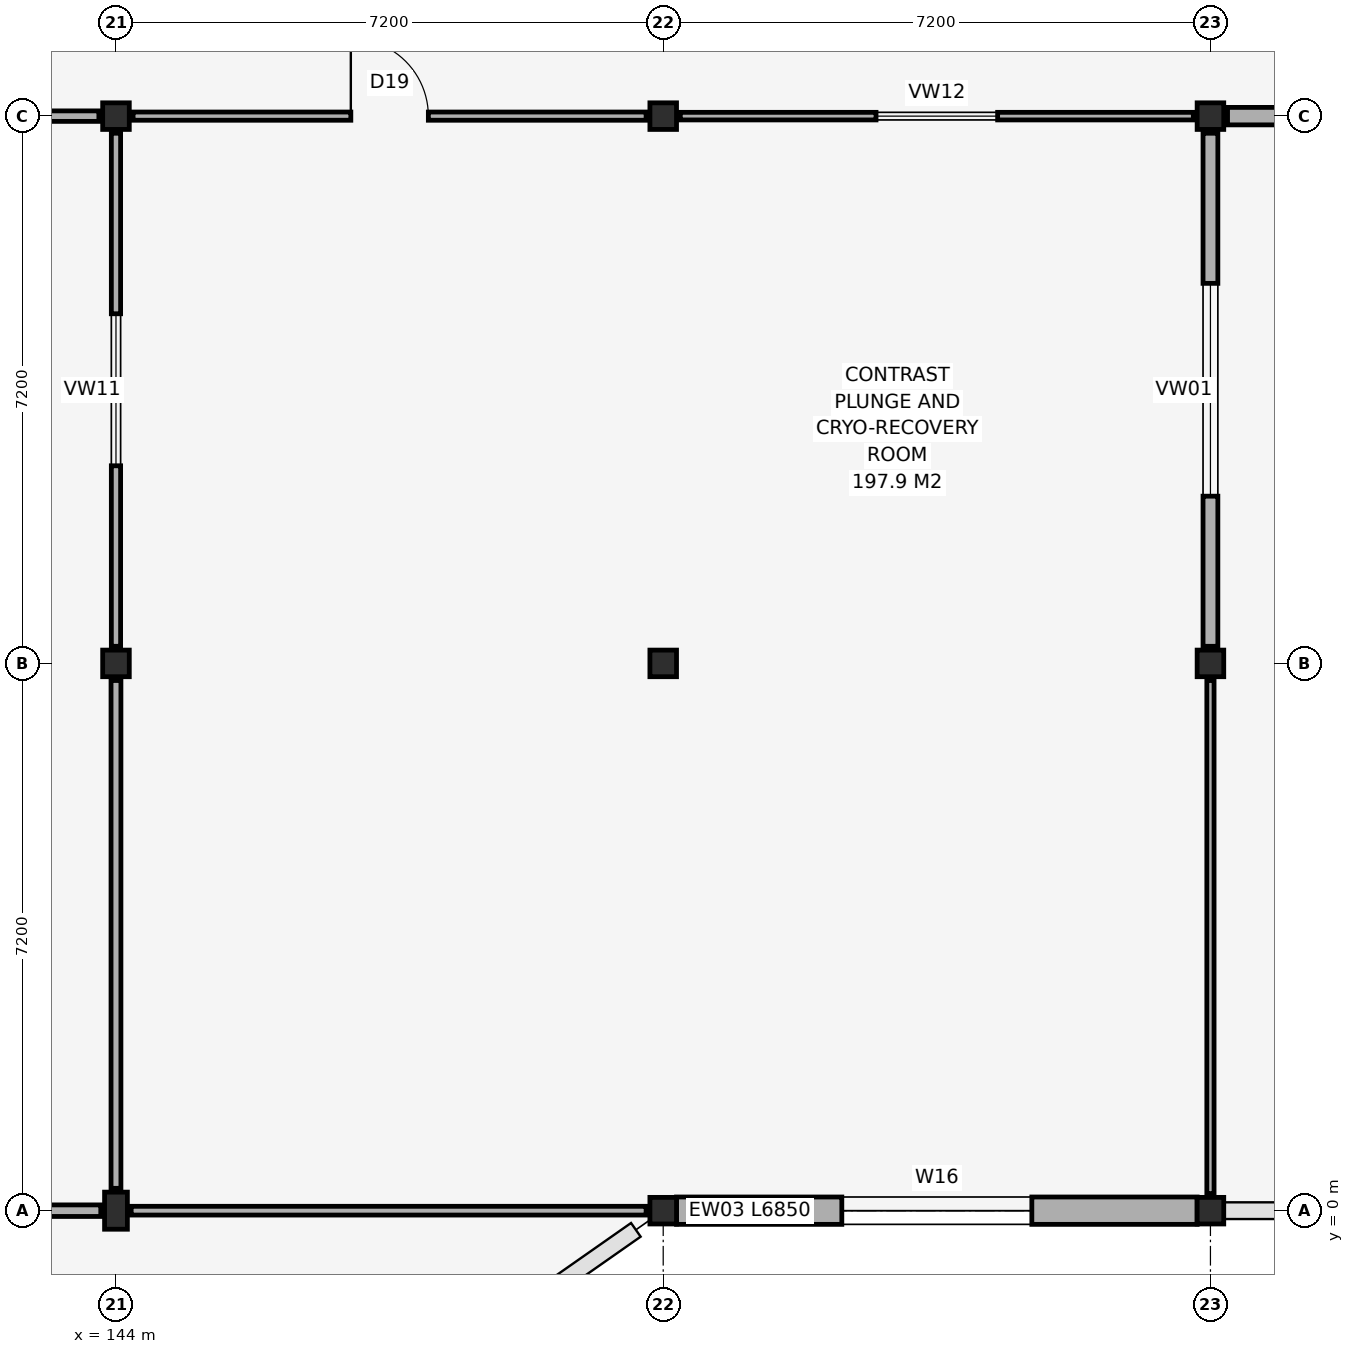
"""IFC4 building model, lengths in metres.
Left out: names, types, materials, properties, quantities, classifications, styles, units other than length and angle.
Written with IfcOpenShell. Run it as: python <this file> out.ifc"""

import sys

from ifc_helpers import new_model, si_unit, direction, frame, frame_2d, origin, origin_2d, place, context, subcontext, project, spatial, rectangle, i_section, extrude, element, fill, save


model = new_model("IFC4")
c1 = context("Model", 3, precision=1e-05, world=origin(), true_north=direction((0.0, 1.0)))
c2 = subcontext(c1, "Body", "Model", "MODEL_VIEW")
j1 = project(units=[si_unit("LENGTHUNIT", "METRE"), si_unit("PLANEANGLEUNIT", "RADIAN")], contexts=[c1])
p1 = place(None, origin())
s1 = spatial("IfcSite", under=j1, at=p1, CompositionType="ELEMENT")
p2 = place(p1, origin())
s2 = spatial("IfcBuilding", under=s1, at=p2, CompositionType="ELEMENT")
p3 = place(p2, frame((0.0, 0.0, 19.2)))
s3 = spatial("IfcBuildingStorey", under=s2, at=p3, CompositionType="ELEMENT", Elevation=19.2)
p4 = place(p3, frame((144.0, 0.0, 0.0), z_axis=(0.0, 0.0, 1.0), x_axis=(1.0, 0.0, 0.0)))
e1 = element("IfcColumn", 1, at=p4, inside=s3, PredefinedType="COLUMN", context=c2, shape_type="SweptSolid", body=[
    extrude(i_section(OverallWidth=0.3, OverallDepth=0.488, WebThickness=0.011, FlangeThickness=0.018, FilletRadius=0.026, at=origin_2d()), origin(), (0.0, 0.0, 1.0), 4.2),
])
for number, where, z_axis, x_axis in (
    (2, (144.0, 7.2, 0.0), (0.0, 0.0, 1.0), (1.0, 0.0, 0.0)),
    (3, (144.0, 14.4, 0.0), (0.0, 0.0, 1.0), (1.0, 0.0, 0.0)),
    (4, (151.2, 0.0, 0.0), (0.0, 0.0, 1.0), (1.0, 0.0, 0.0)),
    (5, (151.2, 7.2, 0.0), (0.0, 0.0, 1.0), (1.0, 0.0, 0.0)),
    (6, (151.2, 14.4, 0.0), (0.0, 0.0, 1.0), (1.0, 0.0, 0.0)),
    (7, (158.4, 0.0, 0.0), (0.0, 0.0, 1.0), (1.0, 0.0, 0.0)),
    (8, (158.4, 7.2, 0.0), (0.0, 0.0, 1.0), (1.0, 0.0, 0.0)),
    (9, (158.4, 14.4, 0.0), (0.0, 0.0, 1.0), (1.0, 0.0, 0.0)),
):
    element("IfcColumn", number, at=place(p3, frame(where, z_axis=z_axis, x_axis=x_axis)), inside=s3, PredefinedType="COLUMN", context=c2, shape_type="SweptSolid", body=[
        extrude(i_section(OverallWidth=0.35, OverallDepth=0.35, WebThickness=0.012, FlangeThickness=0.019, FilletRadius=0.02, at=origin_2d()), origin(), (0.0, 0.0, 1.0), 4.2),
    ])
p5 = place(p3, frame((151.375, 0.0, 0.0), z_axis=(0.0, 0.0, 1.0), x_axis=(1.0, 0.0, 0.0)))
e10 = element("IfcWall", 10, at=p5, inside=s3, PredefinedType="SOLIDWALL", context=c2, shape_type="SweptSolid", body=[
    extrude(rectangle(XDim=6.85, YDim=0.36, at=frame_2d((3.425, 0.0))), origin(), (0.0, 0.0, 1.0), 3.18),
])
p6 = place(p5, frame((2.175, 0.0, 0.95)))
e11 = element("IfcOpeningElement", 11, at=p6, cuts=e10, PredefinedType="OPENING", context=c2, shape_type="SweptSolid", body=[
    extrude(rectangle(XDim=2.5, YDim=1.35, at=frame_2d((1.25, 0.675))), frame((0.0, 0.195, 0.0), z_axis=(0.0, -1.0, 0.0), x_axis=(1.0, 0.0, 0.0)), (0.0, 0.0, 1.0), 0.39),
])
p7 = place(p3, frame((137.025, 0.0, 0.0), z_axis=(0.0, 0.0, 1.0), x_axis=(1.0, 0.0, 0.0)))
e12 = element("IfcWall", 12, at=p7, inside=s3, PredefinedType="PARTITIONING", context=c2, shape_type="SweptSolid", body=[
    extrude(rectangle(XDim=6.775, YDim=0.152, at=frame_2d((3.388, 0.0))), origin(), (0.0, 0.0, 1.0), 3.18),
])
p8 = place(p3, frame((137.025, 14.4, 0.0), z_axis=(0.0, 0.0, 1.0), x_axis=(1.0, 0.0, 0.0)))
e13 = element("IfcWall", 13, at=p8, inside=s3, PredefinedType="PARTITIONING", context=c2, shape_type="SweptSolid", body=[
    extrude(rectangle(XDim=6.75, YDim=0.138, at=frame_2d((3.375, 0.0))), origin(), (0.0, 0.0, 1.0), 3.64),
])
p9 = place(p8, frame((2.075, 0.0, 0.95)))
e14 = element("IfcOpeningElement", 14, at=p9, cuts=e13, PredefinedType="OPENING", context=c2, shape_type="SweptSolid", body=[
    extrude(rectangle(XDim=2.6, YDim=1.2, at=frame_2d((1.3, 0.6))), frame((0.0, 0.084, 0.0), z_axis=(0.0, -1.0, 0.0), x_axis=(1.0, 0.0, 0.0)), (0.0, 0.0, 1.0), 0.168),
])
p10 = place(p3, frame((144.0, 0.294, 0.0), z_axis=(0.0, 0.0, 1.0), x_axis=(0.0, 1.0, 0.0)))
e15 = element("IfcWall", 15, at=p10, inside=s3, PredefinedType="PARTITIONING", context=c2, shape_type="SweptSolid", body=[
    extrude(rectangle(XDim=6.681, YDim=0.13, at=frame_2d((3.341, 0.0))), origin(), (0.0, 0.0, 1.0), 3.18),
])
p11 = place(p3, frame((144.0, 7.425, 0.0), z_axis=(0.0, 0.0, 1.0), x_axis=(0.0, 1.0, 0.0)))
e16 = element("IfcWall", 16, at=p11, inside=s3, PredefinedType="PARTITIONING", context=c2, shape_type="SweptSolid", body=[
    extrude(rectangle(XDim=6.75, YDim=0.122, at=frame_2d((3.375, 0.0))), origin(), (0.0, 0.0, 1.0), 3.64),
])
p12 = place(p11, frame((2.375, 0.0, 0.95)))
e17 = element("IfcOpeningElement", 17, at=p12, cuts=e16, PredefinedType="OPENING", context=c2, shape_type="SweptSolid", body=[
    extrude(rectangle(XDim=2.0, YDim=1.2, at=frame_2d((1.0, 0.6))), frame((0.0, 0.076, 0.0), z_axis=(0.0, -1.0, 0.0), x_axis=(1.0, 0.0, 0.0)), (0.0, 0.0, 1.0), 0.152),
])
p13 = place(p3, frame((144.2, 0.0, 0.0), z_axis=(0.0, 0.0, 1.0), x_axis=(1.0, 0.0, 0.0)))
e18 = element("IfcWall", 18, at=p13, inside=s3, PredefinedType="PARTITIONING", context=c2, shape_type="SweptSolid", body=[
    extrude(rectangle(XDim=6.775, YDim=0.115, at=frame_2d((3.388, 0.0))), origin(), (0.0, 0.0, 1.0), 3.18),
])
p14 = place(p3, frame((144.225, 14.4, 0.0), z_axis=(0.0, 0.0, 1.0), x_axis=(1.0, 0.0, 0.0)))
e19 = element("IfcWall", 19, at=p14, inside=s3, PredefinedType="PARTITIONING", context=c2, shape_type="SweptSolid", body=[
    extrude(rectangle(XDim=6.75, YDim=0.108, at=frame_2d((3.375, 0.0))), origin(), (0.0, 0.0, 1.0), 3.64),
])
p15 = place(p14, frame((2.865, 0.0, 0.0)))
e20 = element("IfcOpeningElement", 20, at=p15, cuts=e19, PredefinedType="OPENING", context=c2, shape_type="SweptSolid", body=[
    extrude(rectangle(XDim=1.02, YDim=2.15, at=frame_2d((0.51, 1.075))), frame((0.0, 0.069, 0.0), z_axis=(0.0, -1.0, 0.0), x_axis=(1.0, 0.0, 0.0)), (0.0, 0.0, 1.0), 0.138),
])
p16 = place(p3, frame((151.425, 14.4, 0.0), z_axis=(0.0, 0.0, 1.0), x_axis=(1.0, 0.0, 0.0)))
e21 = element("IfcWall", 21, at=p16, inside=s3, PredefinedType="PARTITIONING", context=c2, shape_type="SweptSolid", body=[
    extrude(rectangle(XDim=6.75, YDim=0.1, at=frame_2d((3.375, 0.0))), origin(), (0.0, 0.0, 1.0), 3.64),
])
p17 = place(p16, frame((2.575, 0.0, 0.95)))
e22 = element("IfcOpeningElement", 22, at=p17, cuts=e21, PredefinedType="OPENING", context=c2, shape_type="SweptSolid", body=[
    extrude(rectangle(XDim=1.6, YDim=1.2, at=frame_2d((0.8, 0.6))), frame((0.0, 0.065, 0.0), z_axis=(0.0, -1.0, 0.0), x_axis=(1.0, 0.0, 0.0)), (0.0, 0.0, 1.0), 0.13),
])
p18 = place(p3, frame((158.4, 0.225, 0.0), z_axis=(0.0, 0.0, 1.0), x_axis=(0.0, 1.0, 0.0)))
e23 = element("IfcWall", 23, at=p18, inside=s3, PredefinedType="PARTITIONING", context=c2, shape_type="SweptSolid", body=[
    extrude(rectangle(XDim=6.75, YDim=0.095, at=frame_2d((3.375, 0.0))), origin(), (0.0, 0.0, 1.0), 3.64),
])
p19 = place(p3, frame((158.4, 7.425, 0.0), z_axis=(0.0, 0.0, 1.0), x_axis=(0.0, 1.0, 0.0)))
e24 = element("IfcWall", 24, at=p19, inside=s3, PredefinedType="PARTITIONING", context=c2, shape_type="SweptSolid", body=[
    extrude(rectangle(XDim=6.75, YDim=0.195, at=frame_2d((3.375, 0.0))), origin(), (0.0, 0.0, 1.0), 3.64),
])
p20 = place(p19, frame((1.975, 0.0, 0.95)))
e25 = element("IfcOpeningElement", 25, at=p20, cuts=e24, PredefinedType="OPENING", context=c2, shape_type="SweptSolid", body=[
    extrude(rectangle(XDim=2.8, YDim=1.5, at=frame_2d((1.4, 0.75))), frame((0.0, 0.112, 0.0), z_axis=(0.0, -1.0, 0.0), x_axis=(1.0, 0.0, 0.0)), (0.0, 0.0, 1.0), 0.225),
])
p21 = place(p3, frame((158.625, 14.4, 0.0), z_axis=(0.0, 0.0, 1.0), x_axis=(1.0, 0.0, 0.0)))
e26 = element("IfcWall", 26, at=p21, inside=s3, PredefinedType="SOLIDWALL", context=c2, shape_type="SweptSolid", body=[
    extrude(rectangle(XDim=6.775, YDim=0.23, at=frame_2d((3.387, 0.0))), origin(), (0.0, 0.0, 1.0), 3.64),
])
p22 = place(p21, frame((2.805, 0.0, 0.0)))
e27 = element("IfcOpeningElement", 27, at=p22, cuts=e26, PredefinedType="OPENING", context=c2, shape_type="SweptSolid", body=[
    extrude(rectangle(XDim=1.14, YDim=2.15, at=frame_2d((0.57, 1.075))), frame((0.0, 0.13, 0.0), z_axis=(0.0, -1.0, 0.0), x_axis=(1.0, 0.0, 0.0)), (0.0, 0.0, 1.0), 0.26),
])
p23 = place(p6, origin())
e28 = element("IfcWindow", 28, at=p23, inside=s3, PartitioningType="SINGLE_PANEL", PredefinedType="WINDOW", context=c2, shape_type="SweptSolid", body=[
    extrude(rectangle(XDim=2.5, YDim=1.35, at=frame_2d((1.25, 0.675))), frame((0.0, 0.03, 0.0), z_axis=(0.0, -1.0, 0.0), x_axis=(1.0, 0.0, 0.0)), (0.0, 0.0, 1.0), 0.06),
])
fill(e11, e28)
p24 = place(p12, origin())
e29 = element("IfcWindow", 29, at=p24, inside=s3, PartitioningType="SINGLE_PANEL", PredefinedType="WINDOW", context=c2, shape_type="SweptSolid", body=[
    extrude(rectangle(XDim=2.0, YDim=1.2, at=frame_2d((1.0, 0.6))), frame((0.0, 0.03, 0.0), z_axis=(0.0, -1.0, 0.0), x_axis=(1.0, 0.0, 0.0)), (0.0, 0.0, 1.0), 0.06),
])
fill(e17, e29)
p25 = place(p15, frame((1.02, 0.0, 0.0), z_axis=(0.0, 0.0, 1.0), x_axis=(-1.0, 0.0, 0.0)))
e30 = element("IfcDoor", 30, at=p25, inside=s3, OperationType="SINGLE_SWING_RIGHT", PredefinedType="DOOR", context=c2, shape_type="SweptSolid", body=[
    extrude(rectangle(XDim=1.02, YDim=2.15, at=frame_2d((0.51, 1.075))), frame((0.0, 0.025, 0.0), z_axis=(0.0, -1.0, 0.0), x_axis=(1.0, 0.0, 0.0)), (0.0, 0.0, 1.0), 0.05),
])
fill(e20, e30)
p26 = place(p17, origin())
e31 = element("IfcWindow", 31, at=p26, inside=s3, PartitioningType="SINGLE_PANEL", PredefinedType="WINDOW", context=c2, shape_type="SweptSolid", body=[
    extrude(rectangle(XDim=1.6, YDim=1.2, at=frame_2d((0.8, 0.6))), frame((0.0, 0.03, 0.0), z_axis=(0.0, -1.0, 0.0), x_axis=(1.0, 0.0, 0.0)), (0.0, 0.0, 1.0), 0.06),
])
fill(e22, e31)
p27 = place(p20, origin())
e32 = element("IfcWindow", 32, at=p27, inside=s3, PartitioningType="SINGLE_PANEL", PredefinedType="WINDOW", context=c2, shape_type="SweptSolid", body=[
    extrude(rectangle(XDim=2.8, YDim=1.5, at=frame_2d((1.4, 0.75))), frame((0.0, 0.03, 0.0), z_axis=(0.0, -1.0, 0.0), x_axis=(1.0, 0.0, 0.0)), (0.0, 0.0, 1.0), 0.06),
])
fill(e25, e32)
save(model, sys.argv[1])
